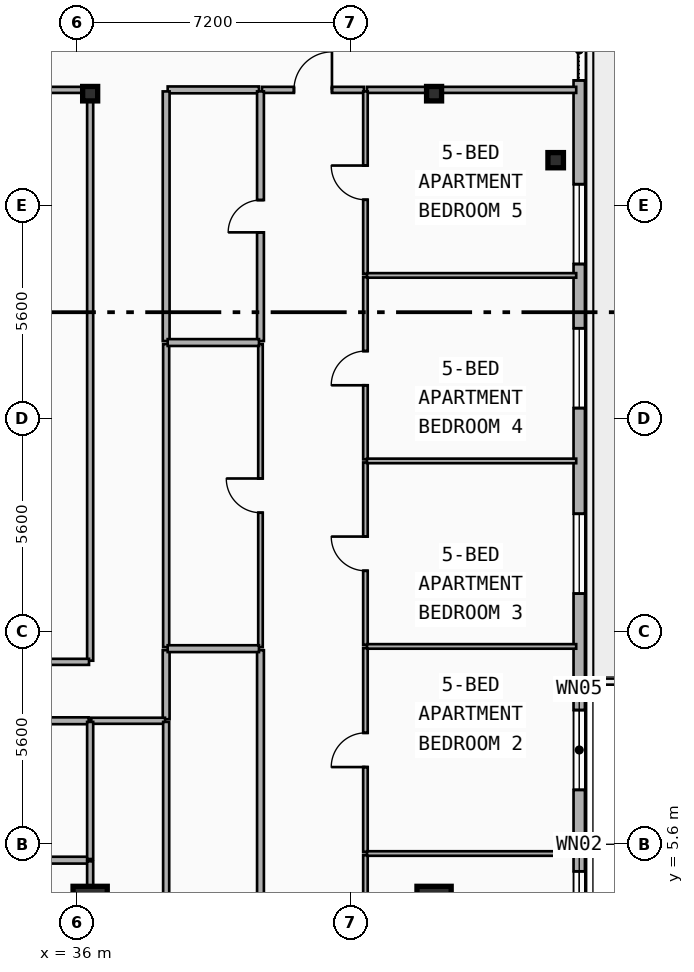
"""IFC4 building model, lengths in metres.
Left out: names, types, materials, properties, quantities, classifications, styles, units other than length and angle.
Written with IfcOpenShell. Run it as: python <this file> out.ifc"""

import sys

from ifc_helpers import new_model, si_unit, direction, frame, frame_2d, origin, origin_2d, place, context, subcontext, project, spatial, rectangle, i_section, extrude, element, fill, save


model = new_model("IFC4")
c1 = context("Model", 3, precision=1e-05, world=origin(), true_north=direction((0.0, 1.0)))
c2 = subcontext(c1, "Body", "Model", "MODEL_VIEW")
j1 = project(units=[si_unit("LENGTHUNIT", "METRE"), si_unit("PLANEANGLEUNIT", "RADIAN")], contexts=[c1])
p1 = place(None, origin())
s1 = spatial("IfcSite", under=j1, at=p1, CompositionType="ELEMENT")
p2 = place(p1, origin())
s2 = spatial("IfcBuilding", under=s1, at=p2, CompositionType="ELEMENT")
p3 = place(p2, frame((0.0, 0.0, 243.6)))
s3 = spatial("IfcBuildingStorey", under=s2, at=p3, CompositionType="ELEMENT", Elevation=243.6)
for number, where, z_axis, x_axis in (
    (1, (36.35, 25.35, 0.0), (0.0, 0.0, 1.0), (1.0, 0.0, 0.0)),
    (2, (45.4, 25.35, 0.0), (0.0, 0.0, 1.0), (1.0, 0.0, 0.0)),
):
    element("IfcColumn", number, at=place(p3, frame(where, z_axis=z_axis, x_axis=x_axis)), inside=s3, PredefinedType="COLUMN", context=c2, shape_type="SweptSolid", body=[
        extrude(i_section(OverallWidth=0.395, OverallDepth=0.38, WebThickness=0.019, FlangeThickness=0.03, FilletRadius=0.015, at=origin_2d()), origin(), (0.0, 0.0, 1.0), 3.7),
    ])
for number, where, z_axis, x_axis in (
    (3, (36.35, 4.153, 0.0), (0.0, -0.09, 0.996), (1.0, 0.0, 0.0)),
    (4, (45.4, 4.153, 0.0), (0.0, -0.09, 0.996), (1.0, 0.0, 0.0)),
):
    element("IfcColumn", number, at=place(p3, frame(where, z_axis=z_axis, x_axis=x_axis)), inside=s3, PredefinedType="COLUMN", context=c2, shape_type="SweptSolid", body=[
        extrude(rectangle(XDim=0.9, YDim=0.9, at=origin_2d()), origin(), (0.0, 0.0, 1.0), 3.715),
    ])
p4 = place(p3, frame((48.6, 23.6, 0.0), z_axis=(0.0, 0.0, 1.0), x_axis=(1.0, 0.0, 0.0)))
e5 = element("IfcColumn", 5, at=p4, inside=s3, PredefinedType="COLUMN", context=c2, shape_type="SweptSolid", body=[
    extrude(i_section(OverallWidth=0.408, OverallDepth=0.4, WebThickness=0.025, FlangeThickness=0.039, FilletRadius=0.015, at=origin_2d()), origin(), (0.0, 0.0, 1.0), 3.7),
])
p5 = place(p3, frame((49.22, 36.8, 0.0), z_axis=(0.0, 0.0, 1.0), x_axis=(0.0, -1.0, 0.0)))
e6 = element("IfcWall", 6, at=p5, inside=s3, PredefinedType="SOLIDWALL", context=c2, shape_type="SweptSolid", body=[
    extrude(rectangle(XDim=34.2, YDim=0.3, at=frame_2d((17.1, 0.0))), origin(), (0.0, 0.0, 1.0), 3.42),
])
p6 = place(p5, frame((9.5, 0.0, 0.0)))
e7 = element("IfcOpeningElement", 7, at=p6, cuts=e6, PredefinedType="OPENING", context=c2, shape_type="SweptSolid", body=[
    extrude(rectangle(XDim=1.6, YDim=2.2, at=frame_2d((0.8, 1.1))), frame((0.0, 0.16, 0.0), z_axis=(0.0, -1.0, 0.0), x_axis=(1.0, 0.0, 0.0)), (0.0, 0.0, 1.0), 0.32),
])
p7 = place(p5, frame((31.912, 0.0, 0.8)))
e8 = element("IfcOpeningElement", 8, at=p7, cuts=e6, PredefinedType="OPENING", context=c2, shape_type="SweptSolid", body=[
    extrude(rectangle(XDim=1.8, YDim=1.8, at=frame_2d((0.9, 0.9))), frame((0.0, 0.16, 0.0), z_axis=(0.0, -1.0, 0.0), x_axis=(1.0, 0.0, 0.0)), (0.0, 0.0, 1.0), 0.32),
])
p8 = place(p5, frame((27.668, 0.0, 0.75)))
e9 = element("IfcOpeningElement", 9, at=p8, cuts=e6, PredefinedType="OPENING", context=c2, shape_type="SweptSolid", body=[
    extrude(rectangle(XDim=2.1, YDim=2.1, at=frame_2d((1.05, 1.05))), frame((0.0, 0.16, 0.0), z_axis=(0.0, -1.0, 0.0), x_axis=(1.0, 0.0, 0.0)), (0.0, 0.0, 1.0), 0.32),
])
p9 = place(p5, frame((22.503, 0.0, 0.75)))
e10 = element("IfcOpeningElement", 10, at=p9, cuts=e6, PredefinedType="OPENING", context=c2, shape_type="SweptSolid", body=[
    extrude(rectangle(XDim=2.1, YDim=2.1, at=frame_2d((1.05, 1.05))), frame((0.0, 0.16, 0.0), z_axis=(0.0, -1.0, 0.0), x_axis=(1.0, 0.0, 0.0)), (0.0, 0.0, 1.0), 0.32),
])
p10 = place(p5, frame((17.623, 0.0, 0.75)))
e11 = element("IfcOpeningElement", 11, at=p10, cuts=e6, PredefinedType="OPENING", context=c2, shape_type="SweptSolid", body=[
    extrude(rectangle(XDim=2.1, YDim=2.1, at=frame_2d((1.05, 1.05))), frame((0.0, 0.16, 0.0), z_axis=(0.0, -1.0, 0.0), x_axis=(1.0, 0.0, 0.0)), (0.0, 0.0, 1.0), 0.32),
])
p11 = place(p5, frame((13.832, 0.0, 0.75)))
e12 = element("IfcOpeningElement", 12, at=p11, cuts=e6, PredefinedType="OPENING", context=c2, shape_type="SweptSolid", body=[
    extrude(rectangle(XDim=2.1, YDim=2.1, at=frame_2d((1.05, 1.05))), frame((0.0, 0.16, 0.0), z_axis=(0.0, -1.0, 0.0), x_axis=(1.0, 0.0, 0.0)), (0.0, 0.0, 1.0), 0.32),
])
p12 = place(p3, frame((40.872, 25.45, 0.0), z_axis=(0.0, 0.0, 1.0), x_axis=(1.0, 0.0, 0.0)))
e13 = element("IfcWall", 13, at=p12, inside=s3, PredefinedType="PARTITIONING", context=c2, shape_type="SweptSolid", body=[
    extrude(rectangle(XDim=2.682, YDim=0.16, at=frame_2d((1.341, 0.0))), origin(), (0.0, 0.0, 1.0), 3.42),
])
p13 = place(p12, frame((0.841, 0.0, 0.0)))
e14 = element("IfcOpeningElement", 14, at=p13, cuts=e13, PredefinedType="OPENING", context=c2, shape_type="SweptSolid", body=[
    extrude(rectangle(XDim=1.0, YDim=2.15, at=frame_2d((0.5, 1.075))), frame((0.0, 0.09, 0.0), z_axis=(0.0, -1.0, 0.0), x_axis=(1.0, 0.0, 0.0)), (0.0, 0.0, 1.0), 0.18),
])
p14 = place(p3, frame((38.39, 25.45, 0.0), z_axis=(0.0, 0.0, 1.0), x_axis=(1.0, 0.0, 0.0)))
e15 = element("IfcWall", 15, at=p14, inside=s3, PredefinedType="PLUMBINGWALL", context=c2, shape_type="SweptSolid", body=[
    extrude(rectangle(XDim=2.402, YDim=0.18, at=frame_2d((1.201, 0.0))), origin(), (0.0, 0.0, 1.0), 3.42),
])
p15 = place(p3, frame((43.634, 25.45, 0.0), z_axis=(0.0, 0.0, 1.0), x_axis=(1.0, 0.0, 0.0)))
e16 = element("IfcWall", 16, at=p15, inside=s3, PredefinedType="PARTITIONING", context=c2, shape_type="SweptSolid", body=[
    extrude(rectangle(XDim=5.506, YDim=0.16, at=frame_2d((2.753, 0.0))), origin(), (0.0, 0.0, 1.0), 2.7),
])
p16 = place(p3, frame((38.35, 8.89, 0.0), z_axis=(0.0, 0.0, 1.0), x_axis=(0.0, 1.0, 0.0)))
e17 = element("IfcWall", 17, at=p16, inside=s3, PredefinedType="PLUMBINGWALL", context=c2, shape_type="SweptSolid", body=[
    extrude(rectangle(XDim=1.817, YDim=0.18, at=frame_2d((0.909, 0.0))), origin(), (0.0, 0.0, 1.0), 3.42),
])
p17 = place(p3, frame((38.35, 10.787, 0.0), z_axis=(0.0, 0.0, 1.0), x_axis=(0.0, 1.0, 0.0)))
e18 = element("IfcWall", 18, at=p17, inside=s3, PredefinedType="PARTITIONING", context=c2, shape_type="SweptSolid", body=[
    extrude(rectangle(XDim=7.975, YDim=0.16, at=frame_2d((3.987, 0.0))), origin(), (0.0, 0.0, 1.0), 2.9),
])
p18 = place(p3, frame((38.35, 18.842, 0.0), z_axis=(0.0, 0.0, 1.0), x_axis=(0.0, 1.0, 0.0)))
e19 = element("IfcWall", 19, at=p18, inside=s3, PredefinedType="PLUMBINGWALL", context=c2, shape_type="SweptSolid", body=[
    extrude(rectangle(XDim=6.568, YDim=0.18, at=frame_2d((3.284, 0.0))), origin(), (0.0, 0.0, 1.0), 2.9),
])
for number, where, z_axis, x_axis in (
    (20, (34.415, 8.85, 0.0), (0.0, 0.0, 1.0), (1.0, 0.0, 0.0)),
    (21, (34.415, 5.182, 0.0), (0.0, 0.0, 1.0), (1.0, 0.0, 0.0)),
):
    element("IfcWall", number, at=place(p3, frame(where, z_axis=z_axis, x_axis=x_axis)), inside=s3, PredefinedType="PLUMBINGWALL", context=c2, shape_type="SweptSolid", body=[
        extrude(rectangle(XDim=1.895, YDim=0.18, at=frame_2d((0.948, 0.0))), origin(), (0.0, 0.0, 1.0), 2.7),
    ])
p19 = place(p3, frame((40.832, -1.34, 0.0), z_axis=(0.0, 0.0, 1.0), x_axis=(0.0, 1.0, 0.0)))
e22 = element("IfcWall", 22, at=p19, inside=s3, PredefinedType="PLUMBINGWALL", context=c2, shape_type="SweptSolid", body=[
    extrude(rectangle(XDim=12.047, YDim=0.18, at=frame_2d((6.023, 0.0))), origin(), (0.0, 0.0, 1.0), 3.05),
])
p20 = place(p19, frame((0.589, 0.0, 0.0)))
e23 = element("IfcOpeningElement", 23, at=p20, cuts=e22, PredefinedType="OPENING", context=c2, shape_type="SweptSolid", body=[
    extrude(rectangle(XDim=1.0, YDim=2.15, at=frame_2d((0.5, 1.075))), frame((0.0, 0.1, 0.0), z_axis=(0.0, -1.0, 0.0), x_axis=(1.0, 0.0, 0.0)), (0.0, 0.0, 1.0), 0.2),
])
p21 = place(p3, frame((40.832, 10.787, 0.0), z_axis=(0.0, 0.0, 1.0), x_axis=(0.0, 1.0, 0.0)))
e24 = element("IfcWall", 24, at=p21, inside=s3, PredefinedType="PARTITIONING", context=c2, shape_type="SweptSolid", body=[
    extrude(rectangle(XDim=7.975, YDim=0.12, at=frame_2d((3.987, 0.0))), origin(), (0.0, 0.0, 1.0), 2.9),
])
p22 = place(p21, frame((3.538, 0.0, 0.0)))
e25 = element("IfcOpeningElement", 25, at=p22, cuts=e24, PredefinedType="OPENING", context=c2, shape_type="SweptSolid", body=[
    extrude(rectangle(XDim=0.9, YDim=2.1, at=frame_2d((0.45, 1.05))), frame((0.0, 0.07, 0.0), z_axis=(0.0, -1.0, 0.0), x_axis=(1.0, 0.0, 0.0)), (0.0, 0.0, 1.0), 0.14),
])
p23 = place(p3, frame((40.832, 18.842, 0.0), z_axis=(0.0, 0.0, 1.0), x_axis=(0.0, 1.0, 0.0)))
e26 = element("IfcWall", 26, at=p23, inside=s3, PredefinedType="PLUMBINGWALL", context=c2, shape_type="SweptSolid", body=[
    extrude(rectangle(XDim=6.568, YDim=0.18, at=frame_2d((3.284, 0.0))), origin(), (0.0, 0.0, 1.0), 2.9),
])
p24 = place(p23, frame((2.859, 0.0, 0.0)))
e27 = element("IfcOpeningElement", 27, at=p24, cuts=e26, PredefinedType="OPENING", context=c2, shape_type="SweptSolid", body=[
    extrude(rectangle(XDim=0.85, YDim=2.1, at=frame_2d((0.425, 1.05))), frame((0.0, 0.1, 0.0), z_axis=(0.0, -1.0, 0.0), x_axis=(1.0, 0.0, 0.0)), (0.0, 0.0, 1.0), 0.2),
])
p25 = place(p3, frame((43.594, -1.34, 0.0), z_axis=(0.0, 0.0, 1.0), x_axis=(0.0, 1.0, 0.0)))
e28 = element("IfcWall", 28, at=p25, inside=s3, PredefinedType="PARTITIONING", context=c2, shape_type="SweptSolid", body=[
    extrude(rectangle(XDim=6.657, YDim=0.12, at=frame_2d((3.329, 0.0))), origin(), (0.0, 0.0, 1.0), 3.08),
])
p26 = place(p25, frame((2.878, 0.0, 0.0)))
e29 = element("IfcOpeningElement", 29, at=p26, cuts=e28, PredefinedType="OPENING", context=c2, shape_type="SweptSolid", body=[
    extrude(rectangle(XDim=0.9, YDim=2.1, at=frame_2d((0.45, 1.05))), frame((0.0, 0.07, 0.0), z_axis=(0.0, -1.0, 0.0), x_axis=(1.0, 0.0, 0.0)), (0.0, 0.0, 1.0), 0.14),
])
p27 = place(p3, frame((43.594, 5.397, 0.0), z_axis=(0.0, 0.0, 1.0), x_axis=(0.0, 1.0, 0.0)))
e30 = element("IfcWall", 30, at=p27, inside=s3, PredefinedType="PARTITIONING", context=c2, shape_type="SweptSolid", body=[
    extrude(rectangle(XDim=5.369, YDim=0.12, at=frame_2d((2.685, 0.0))), origin(), (0.0, 0.0, 1.0), 3.05),
])
p28 = place(p27, frame((2.235, 0.0, 0.0)))
e31 = element("IfcOpeningElement", 31, at=p28, cuts=e30, PredefinedType="OPENING", context=c2, shape_type="SweptSolid", body=[
    extrude(rectangle(XDim=0.9, YDim=2.1, at=frame_2d((0.45, 1.05))), frame((0.0, 0.07, 0.0), z_axis=(0.0, -1.0, 0.0), x_axis=(1.0, 0.0, 0.0)), (0.0, 0.0, 1.0), 0.14),
])
p29 = place(p3, frame((43.594, 10.846, 0.0), z_axis=(0.0, 0.0, 1.0), x_axis=(0.0, 1.0, 0.0)))
e32 = element("IfcWall", 32, at=p29, inside=s3, PredefinedType="PARTITIONING", context=c2, shape_type="SweptSolid", body=[
    extrude(rectangle(XDim=4.801, YDim=0.12, at=frame_2d((2.4, 0.0))), origin(), (0.0, 0.0, 1.0), 2.9),
])
p30 = place(p29, frame((1.95, 0.0, 0.0)))
e33 = element("IfcOpeningElement", 33, at=p30, cuts=e32, PredefinedType="OPENING", context=c2, shape_type="SweptSolid", body=[
    extrude(rectangle(XDim=0.9, YDim=2.1, at=frame_2d((0.45, 1.05))), frame((0.0, 0.07, 0.0), z_axis=(0.0, -1.0, 0.0), x_axis=(1.0, 0.0, 0.0)), (0.0, 0.0, 1.0), 0.14),
])
p31 = place(p3, frame((43.594, 15.727, 0.0), z_axis=(0.0, 0.0, 1.0), x_axis=(0.0, 1.0, 0.0)))
e34 = element("IfcWall", 34, at=p31, inside=s3, PredefinedType="PARTITIONING", context=c2, shape_type="SweptSolid", body=[
    extrude(rectangle(XDim=4.801, YDim=0.12, at=frame_2d((2.4, 0.0))), origin(), (0.0, 0.0, 1.0), 2.9),
])
p32 = place(p31, frame((1.95, 0.0, 0.0)))
e35 = element("IfcOpeningElement", 35, at=p32, cuts=e34, PredefinedType="OPENING", context=c2, shape_type="SweptSolid", body=[
    extrude(rectangle(XDim=0.9, YDim=2.1, at=frame_2d((0.45, 1.05))), frame((0.0, 0.07, 0.0), z_axis=(0.0, -1.0, 0.0), x_axis=(1.0, 0.0, 0.0)), (0.0, 0.0, 1.0), 0.14),
])
p33 = place(p3, frame((43.594, 20.608, 0.0), z_axis=(0.0, 0.0, 1.0), x_axis=(0.0, 1.0, 0.0)))
e36 = element("IfcWall", 36, at=p33, inside=s3, PredefinedType="PARTITIONING", context=c2, shape_type="SweptSolid", body=[
    extrude(rectangle(XDim=4.802, YDim=0.12, at=frame_2d((2.401, 0.0))), origin(), (0.0, 0.0, 1.0), 3.05),
])
p34 = place(p33, frame((1.951, 0.0, 0.0)))
e37 = element("IfcOpeningElement", 37, at=p34, cuts=e36, PredefinedType="OPENING", context=c2, shape_type="SweptSolid", body=[
    extrude(rectangle(XDim=0.9, YDim=2.1, at=frame_2d((0.45, 1.05))), frame((0.0, 0.07, 0.0), z_axis=(0.0, -1.0, 0.0), x_axis=(1.0, 0.0, 0.0)), (0.0, 0.0, 1.0), 0.14),
])
for number, where, z_axis, x_axis in (
    (38, (38.39, 10.747, 0.0), (0.0, 0.0, 1.0), (1.0, 0.0, 0.0)),
    (39, (38.39, 18.802, 0.0), (0.0, 0.0, 1.0), (1.0, 0.0, 0.0)),
):
    element("IfcWall", number, at=place(p3, frame(where, z_axis=z_axis, x_axis=x_axis)), inside=s3, PredefinedType="PLUMBINGWALL", context=c2, shape_type="SweptSolid", body=[
        extrude(rectangle(XDim=2.402, YDim=0.18, at=frame_2d((1.201, 0.0))), origin(), (0.0, 0.0, 1.0), 3.42),
    ])
for number, where, z_axis, x_axis in (
    (40, (43.634, 5.357, 0.0), (0.0, 0.0, 1.0), (1.0, 0.0, 0.0)),
    (41, (43.634, 10.806, 0.0), (0.0, 0.0, 1.0), (1.0, 0.0, 0.0)),
    (42, (43.634, 15.687, 0.0), (0.0, 0.0, 1.0), (1.0, 0.0, 0.0)),
    (43, (43.634, 20.568, 0.0), (0.0, 0.0, 1.0), (1.0, 0.0, 0.0)),
):
    element("IfcWall", number, at=place(p3, frame(where, z_axis=z_axis, x_axis=x_axis)), inside=s3, PredefinedType="PARTITIONING", context=c2, shape_type="SweptSolid", body=[
        extrude(rectangle(XDim=5.506, YDim=0.12, at=frame_2d((2.753, 0.0))), origin(), (0.0, 0.0, 1.0), 2.7),
    ])
p35 = place(p3, frame((20.48, 25.45, 0.0), z_axis=(0.0, 0.0, 1.0), x_axis=(1.0, 0.0, 0.0)))
e44 = element("IfcWall", 44, at=p35, inside=s3, PredefinedType="PARTITIONING", context=c2, shape_type="SweptSolid", body=[
    extrude(rectangle(XDim=15.84, YDim=0.16, at=frame_2d((7.92, 0.0))), origin(), (0.0, 0.0, 1.0), 2.7),
])
p36 = place(p3, frame((36.38, 8.85, 0.0), z_axis=(0.0, 0.0, 1.0), x_axis=(1.0, 0.0, 0.0)))
e45 = element("IfcWall", 45, at=p36, inside=s3, PredefinedType="PARTITIONING", context=c2, shape_type="SweptSolid", body=[
    extrude(rectangle(XDim=1.94, YDim=0.16, at=frame_2d((0.97, 0.0))), origin(), (0.0, 0.0, 1.0), 2.7),
])
p37 = place(p3, frame((36.35, 10.43, 0.0), z_axis=(0.0, 0.0, 1.0), x_axis=(0.0, 1.0, 0.0)))
e46 = element("IfcWall", 46, at=p37, inside=s3, PredefinedType="PARTITIONING", context=c2, shape_type="SweptSolid", body=[
    extrude(rectangle(XDim=14.99, YDim=0.16, at=frame_2d((7.495, 0.0))), origin(), (0.0, 0.0, 1.0), 2.7),
])
p38 = place(p3, frame((34.48, 10.4, 0.0), z_axis=(0.0, 0.0, 1.0), x_axis=(1.0, 0.0, 0.0)))
e47 = element("IfcWall", 47, at=p38, inside=s3, PredefinedType="PARTITIONING", context=c2, shape_type="SweptSolid", body=[
    extrude(rectangle(XDim=1.84, YDim=0.16, at=frame_2d((0.92, 0.0))), origin(), (0.0, 0.0, 1.0), 2.7),
])
p39 = place(p3, frame((36.35, -1.31, 0.0), z_axis=(0.0, 0.0, 1.0), x_axis=(0.0, 1.0, 0.0)))
e48 = element("IfcWall", 48, at=p39, inside=s3, PredefinedType="PARTITIONING", context=c2, shape_type="SweptSolid", body=[
    extrude(rectangle(XDim=6.462, YDim=0.16, at=frame_2d((3.231, 0.0))), origin(), (0.0, 0.0, 1.0), 2.7),
])
p40 = place(p3, frame((36.35, 5.212, 0.0), z_axis=(0.0, 0.0, 1.0), x_axis=(0.0, 1.0, 0.0)))
e49 = element("IfcWall", 49, at=p40, inside=s3, PredefinedType="PARTITIONING", context=c2, shape_type="SweptSolid", body=[
    extrude(rectangle(XDim=3.608, YDim=0.16, at=frame_2d((1.804, 0.0))), origin(), (0.0, 0.0, 1.0), 2.7),
])
p41 = place(p3, frame((38.35, -1.31, 0.0), z_axis=(0.0, 0.0, 1.0), x_axis=(0.0, 1.0, 0.0)))
e50 = element("IfcWall", 50, at=p41, inside=s3, PredefinedType="PARTITIONING", context=c2, shape_type="SweptSolid", body=[
    extrude(rectangle(XDim=10.13, YDim=0.16, at=frame_2d((5.065, 0.0))), origin(), (0.0, 0.0, 1.0), 3.05),
])
p42 = place(p6, origin())
e51 = element("IfcDoor", 51, at=p42, inside=s3, OperationType="DOUBLE_DOOR_SLIDING", PredefinedType="DOOR", context=c2, shape_type="SweptSolid", body=[
    extrude(rectangle(XDim=1.6, YDim=2.2, at=frame_2d((0.8, 1.1))), frame((0.0, 0.025, 0.0), z_axis=(0.0, -1.0, 0.0), x_axis=(1.0, 0.0, 0.0)), (0.0, 0.0, 1.0), 0.05),
])
fill(e7, e51)
p43 = place(p7, origin())
e52 = element("IfcWindow", 52, at=p43, inside=s3, PartitioningType="SINGLE_PANEL", PredefinedType="WINDOW", context=c2, shape_type="SweptSolid", body=[
    extrude(rectangle(XDim=1.8, YDim=1.8, at=frame_2d((0.9, 0.9))), frame((0.0, 0.03, 0.0), z_axis=(0.0, -1.0, 0.0), x_axis=(1.0, 0.0, 0.0)), (0.0, 0.0, 1.0), 0.06),
])
fill(e8, e52)
p44 = place(p8, origin())
e53 = element("IfcWindow", 53, at=p44, inside=s3, PartitioningType="SINGLE_PANEL", PredefinedType="WINDOW", context=c2, shape_type="SweptSolid", body=[
    extrude(rectangle(XDim=2.1, YDim=2.1, at=frame_2d((1.05, 1.05))), frame((0.0, 0.03, 0.0), z_axis=(0.0, -1.0, 0.0), x_axis=(1.0, 0.0, 0.0)), (0.0, 0.0, 1.0), 0.06),
])
fill(e9, e53)
p45 = place(p9, origin())
e54 = element("IfcWindow", 54, at=p45, inside=s3, PartitioningType="SINGLE_PANEL", PredefinedType="WINDOW", context=c2, shape_type="SweptSolid", body=[
    extrude(rectangle(XDim=2.1, YDim=2.1, at=frame_2d((1.05, 1.05))), frame((0.0, 0.03, 0.0), z_axis=(0.0, -1.0, 0.0), x_axis=(1.0, 0.0, 0.0)), (0.0, 0.0, 1.0), 0.06),
])
fill(e10, e54)
p46 = place(p10, origin())
e55 = element("IfcWindow", 55, at=p46, inside=s3, PartitioningType="SINGLE_PANEL", PredefinedType="WINDOW", context=c2, shape_type="SweptSolid", body=[
    extrude(rectangle(XDim=2.1, YDim=2.1, at=frame_2d((1.05, 1.05))), frame((0.0, 0.03, 0.0), z_axis=(0.0, -1.0, 0.0), x_axis=(1.0, 0.0, 0.0)), (0.0, 0.0, 1.0), 0.06),
])
fill(e11, e55)
p47 = place(p11, origin())
e56 = element("IfcWindow", 56, at=p47, inside=s3, PartitioningType="SINGLE_PANEL", PredefinedType="WINDOW", context=c2, shape_type="SweptSolid", body=[
    extrude(rectangle(XDim=2.1, YDim=2.1, at=frame_2d((1.05, 1.05))), frame((0.0, 0.03, 0.0), z_axis=(0.0, -1.0, 0.0), x_axis=(1.0, 0.0, 0.0)), (0.0, 0.0, 1.0), 0.06),
])
fill(e12, e56)
p48 = place(p13, origin())
e57 = element("IfcDoor", 57, at=p48, inside=s3, OperationType="SINGLE_SWING_RIGHT", PredefinedType="DOOR", context=c2, shape_type="SweptSolid", body=[
    extrude(rectangle(XDim=1.0, YDim=2.15, at=frame_2d((0.5, 1.075))), frame((0.0, 0.025, 0.0), z_axis=(0.0, -1.0, 0.0), x_axis=(1.0, 0.0, 0.0)), (0.0, 0.0, 1.0), 0.05),
])
fill(e14, e57)
p49 = place(p22, origin())
e58 = element("IfcDoor", 58, at=p49, inside=s3, OperationType="SINGLE_SWING_RIGHT", PredefinedType="DOOR", context=c2, shape_type="SweptSolid", body=[
    extrude(rectangle(XDim=0.9, YDim=2.1, at=frame_2d((0.45, 1.05))), frame((0.0, 0.025, 0.0), z_axis=(0.0, -1.0, 0.0), x_axis=(1.0, 0.0, 0.0)), (0.0, 0.0, 1.0), 0.05),
])
fill(e25, e58)
p50 = place(p24, origin())
e59 = element("IfcDoor", 59, at=p50, inside=s3, OperationType="SINGLE_SWING_LEFT", PredefinedType="DOOR", context=c2, shape_type="SweptSolid", body=[
    extrude(rectangle(XDim=0.85, YDim=2.1, at=frame_2d((0.425, 1.05))), frame((0.0, 0.025, 0.0), z_axis=(0.0, -1.0, 0.0), x_axis=(1.0, 0.0, 0.0)), (0.0, 0.0, 1.0), 0.05),
])
fill(e27, e59)
p51 = place(p28, origin())
e60 = element("IfcDoor", 60, at=p51, inside=s3, OperationType="SINGLE_SWING_LEFT", PredefinedType="DOOR", context=c2, shape_type="SweptSolid", body=[
    extrude(rectangle(XDim=0.9, YDim=2.1, at=frame_2d((0.45, 1.05))), frame((0.0, 0.025, 0.0), z_axis=(0.0, -1.0, 0.0), x_axis=(1.0, 0.0, 0.0)), (0.0, 0.0, 1.0), 0.05),
])
fill(e31, e60)
p52 = place(p30, origin())
e61 = element("IfcDoor", 61, at=p52, inside=s3, OperationType="SINGLE_SWING_RIGHT", PredefinedType="DOOR", context=c2, shape_type="SweptSolid", body=[
    extrude(rectangle(XDim=0.9, YDim=2.1, at=frame_2d((0.45, 1.05))), frame((0.0, 0.025, 0.0), z_axis=(0.0, -1.0, 0.0), x_axis=(1.0, 0.0, 0.0)), (0.0, 0.0, 1.0), 0.05),
])
fill(e33, e61)
p53 = place(p32, origin())
e62 = element("IfcDoor", 62, at=p53, inside=s3, OperationType="SINGLE_SWING_LEFT", PredefinedType="DOOR", context=c2, shape_type="SweptSolid", body=[
    extrude(rectangle(XDim=0.9, YDim=2.1, at=frame_2d((0.45, 1.05))), frame((0.0, 0.025, 0.0), z_axis=(0.0, -1.0, 0.0), x_axis=(1.0, 0.0, 0.0)), (0.0, 0.0, 1.0), 0.05),
])
fill(e35, e62)
p54 = place(p34, origin())
e63 = element("IfcDoor", 63, at=p54, inside=s3, OperationType="SINGLE_SWING_RIGHT", PredefinedType="DOOR", context=c2, shape_type="SweptSolid", body=[
    extrude(rectangle(XDim=0.9, YDim=2.1, at=frame_2d((0.45, 1.05))), frame((0.0, 0.025, 0.0), z_axis=(0.0, -1.0, 0.0), x_axis=(1.0, 0.0, 0.0)), (0.0, 0.0, 1.0), 0.05),
])
fill(e37, e63)
save(model, sys.argv[1])
